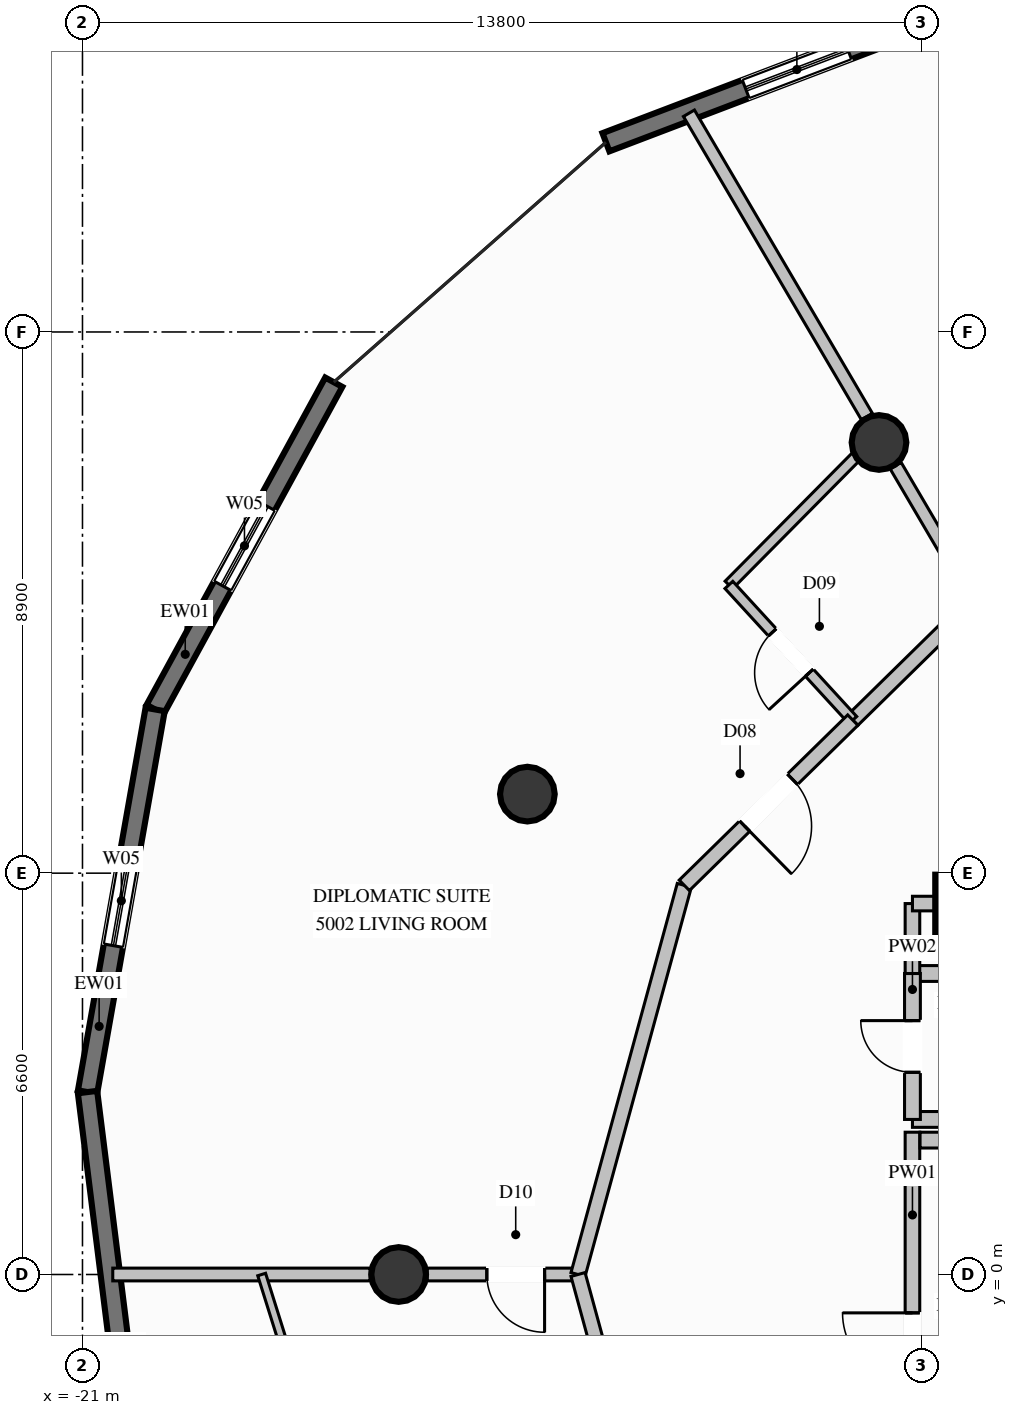
"""IFC4 building model, lengths in metres.
Left out: names, types, materials, properties, quantities, classifications, styles, units other than length and angle.
Written with IfcOpenShell. Run it as: python <this file> out.ifc"""

import sys

from ifc_helpers import new_model, si_unit, direction, frame, frame_2d, origin, origin_2d, place, context, subcontext, project, spatial, rectangle, circle, extrude, element, fill, save


model = new_model("IFC4")
c1 = context("Model", 3, precision=1e-05, world=origin(), true_north=direction((0.0, 1.0)))
c2 = subcontext(c1, "Body", "Model", "MODEL_VIEW")
j1 = project(units=[si_unit("LENGTHUNIT", "METRE"), si_unit("PLANEANGLEUNIT", "RADIAN")], contexts=[c1])
p1 = place(None, origin())
s1 = spatial("IfcSite", under=j1, at=p1, CompositionType="ELEMENT")
p2 = place(p1, origin())
s2 = spatial("IfcBuilding", under=s1, at=p2, CompositionType="ELEMENT")
p3 = place(p2, frame((0.0, 0.0, 187.6)))
s3 = spatial("IfcBuildingStorey", under=s2, at=p3, CompositionType="ELEMENT", Elevation=187.6)
p4 = place(p3, frame((-6.5, 6.1, 0.0), z_axis=(0.0, 0.0, 1.0), x_axis=(1.0, 0.0, 0.0)))
e1 = element("IfcColumn", 1, at=p4, inside=s3, PredefinedType="COLUMN", context=c2, shape_type="SweptSolid", body=[
    extrude(rectangle(XDim=0.95, YDim=0.95, at=origin_2d()), origin(), (0.0, 0.0, 1.0), 3.6),
])
for number, where, z_axis, x_axis in (
    (2, (-7.9, 13.683, 0.0), (0.0, 0.0, 1.0), (1.0, 0.0, 0.0)),
    (3, (-13.683, 7.9, 0.0), (0.0, 0.0, 1.0), (1.0, 0.0, 0.0)),
    (4, (-15.8, 0.0, 0.0), (0.0, 0.0, 1.0), (1.0, 0.0, 0.0)),
):
    element("IfcColumn", number, at=place(p3, frame(where, z_axis=z_axis, x_axis=x_axis)), inside=s3, PredefinedType="COLUMN", context=c2, shape_type="SweptSolid", body=[
        extrude(circle(Radius=0.45, at=origin_2d()), origin(), (0.0, 0.0, 1.0), 3.6),
    ])
p5 = place(p3, frame((-12.391, 18.62, 0.0), z_axis=(0.0, 0.0, 1.0), x_axis=(0.934568736607, 0.355782625429, 0.0)))
e5 = element("IfcWall", 5, at=p5, inside=s3, PredefinedType="SOLIDWALL", context=c2, shape_type="SweptSolid", body=[
    extrude(rectangle(XDim=5.967, YDim=0.32, at=frame_2d((2.983, 0.0))), origin(), (0.0, 0.0, 1.0), 3.36),
])
p6 = place(p5, frame((2.46, 0.0, 0.35)))
e6 = element("IfcOpeningElement", 6, at=p6, cuts=e5, PredefinedType="OPENING", context=c2, shape_type="SweptSolid", body=[
    extrude(rectangle(XDim=1.8, YDim=2.6, at=frame_2d((0.9, 1.3))), frame((0.0, 0.17, 0.0), z_axis=(0.0, -1.0, 0.0), x_axis=(1.0, 0.0, 0.0)), (0.0, 0.0, 1.0), 0.34),
])
p7 = place(p3, frame((-19.805, 9.292, 0.0), z_axis=(0.0, 0.0, 1.0), x_axis=(0.479142226632, 0.877737276557, 0.0)))
e7 = element("IfcWall", 7, at=p7, inside=s3, PredefinedType="SOLIDWALL", context=c2, shape_type="SweptSolid", body=[
    extrude(rectangle(XDim=6.132, YDim=0.32, at=frame_2d((3.066, 0.0))), origin(), (0.0, 0.0, 1.0), 3.36),
])
p8 = place(p7, frame((2.316, 0.0, 0.85)))
e8 = element("IfcOpeningElement", 8, at=p8, cuts=e7, PredefinedType="OPENING", context=c2, shape_type="SweptSolid", body=[
    extrude(rectangle(XDim=1.5, YDim=1.2, at=frame_2d((0.75, 0.6))), frame((0.0, 0.17, 0.0), z_axis=(0.0, -1.0, 0.0), x_axis=(1.0, 0.0, 0.0)), (0.0, 0.0, 1.0), 0.34),
])
p9 = place(p3, frame((-20.917, 3.0, 0.0), z_axis=(0.0, 0.0, 1.0), x_axis=(0.174044717196, 0.984737750072, 0.0)))
e9 = element("IfcWall", 9, at=p9, inside=s3, PredefinedType="SOLIDWALL", context=c2, shape_type="SweptSolid", body=[
    extrude(rectangle(XDim=6.389, YDim=0.32, at=frame_2d((3.195, 0.0))), origin(), (0.0, 0.0, 1.0), 3.36),
])
p10 = place(p9, frame((2.445, 0.0, 0.85)))
e10 = element("IfcOpeningElement", 10, at=p10, cuts=e9, PredefinedType="OPENING", context=c2, shape_type="SweptSolid", body=[
    extrude(rectangle(XDim=1.5, YDim=1.2, at=frame_2d((0.75, 0.6))), frame((0.0, 0.17, 0.0), z_axis=(0.0, -1.0, 0.0), x_axis=(1.0, 0.0, 0.0)), (0.0, 0.0, 1.0), 0.34),
])
p11 = place(p3, frame((-20.093, -3.585, 0.0), z_axis=(0.0, 0.0, 1.0), x_axis=(-0.12416151274, 0.992262021219, 0.0)))
e11 = element("IfcWall", 11, at=p11, inside=s3, PredefinedType="SOLIDWALL", context=c2, shape_type="SweptSolid", body=[
    extrude(rectangle(XDim=6.636, YDim=0.32, at=frame_2d((3.318, 0.0))), origin(), (0.0, 0.0, 1.0), 3.36),
])
p12 = place(p11, frame((1.004, 0.0, 0.85)))
e12 = element("IfcOpeningElement", 12, at=p12, cuts=e11, PredefinedType="OPENING", context=c2, shape_type="SweptSolid", body=[
    extrude(rectangle(XDim=1.5, YDim=1.2, at=frame_2d((0.75, 0.6))), frame((0.0, 0.17, 0.0), z_axis=(0.0, -1.0, 0.0), x_axis=(1.0, 0.0, 0.0)), (0.0, 0.0, 1.0), 0.34),
])
p13 = place(p3, frame((-7.35, -3.38, 0.0), z_axis=(0.0, 0.0, 1.0), x_axis=(0.0, 1.0, 0.0)))
e13 = element("IfcWall", 13, at=p13, inside=s3, PredefinedType="PARTITIONING", context=c2, shape_type="SweptSolid", body=[
    extrude(rectangle(XDim=5.72, YDim=0.24, at=frame_2d((2.86, 0.0))), origin(), (0.0, 0.0, 1.0), 2.445),
])
p14 = place(p13, frame((1.599, 0.0, 0.0)))
e14 = element("IfcOpeningElement", 14, at=p14, cuts=e13, PredefinedType="OPENING", context=c2, shape_type="SweptSolid", body=[
    extrude(rectangle(XDim=1.15, YDim=2.2, at=frame_2d((0.575, 1.1))), frame((0.0, 0.13, 0.0), z_axis=(0.0, -1.0, 0.0), x_axis=(1.0, 0.0, 0.0)), (0.0, 0.0, 1.0), 0.26),
])
p15 = place(p3, frame((-7.225, 2.21, 0.0), z_axis=(0.0, 0.0, 1.0), x_axis=(1.0, 0.0, 0.0)))
e15 = element("IfcWall", 15, at=p15, inside=s3, PredefinedType="PARTITIONING", context=c2, shape_type="SweptSolid", body=[
    extrude(rectangle(XDim=0.875, YDim=0.26, at=frame_2d((0.438, 0.0))), origin(), (0.0, 0.0, 1.0), 3.36),
])
for number, where, z_axis, x_axis in (
    (16, (-7.35, 4.95, 0.0), (0.0, 0.0, 1.0), (1.0, 0.0, 0.0)),
    (17, (-7.35, 2.55, 0.0), (0.0, 0.0, 1.0), (1.0, 0.0, 0.0)),
):
    element("IfcWall", number, at=place(p3, frame(where, z_axis=z_axis, x_axis=x_axis)), inside=s3, PredefinedType="PARTITIONING", context=c2, shape_type="SweptSolid", body=[
        extrude(rectangle(XDim=0.93, YDim=0.26, at=frame_2d((0.465, 0.0))), origin(), (0.0, 0.0, 1.0), 3.36),
    ])
p16 = place(p3, frame((-7.35, 2.55, 0.0), z_axis=(0.0, 0.0, 1.0), x_axis=(0.0, 1.0, 0.0)))
e18 = element("IfcWall", 18, at=p16, inside=s3, PredefinedType="PARTITIONING", context=c2, shape_type="SweptSolid", body=[
    extrude(rectangle(XDim=2.4, YDim=0.26, at=frame_2d((1.2, 0.0))), origin(), (0.0, 0.0, 1.0), 2.445),
])
p17 = place(p16, frame((0.775, 0.0, 0.0)))
e19 = element("IfcOpeningElement", 19, at=p17, cuts=e18, PredefinedType="OPENING", context=c2, shape_type="SweptSolid", body=[
    extrude(rectangle(XDim=0.85, YDim=2.05, at=frame_2d((0.425, 1.025))), frame((0.0, 0.14, 0.0), z_axis=(0.0, -1.0, 0.0), x_axis=(1.0, 0.0, 0.0)), (0.0, 0.0, 1.0), 0.28),
])
p18 = place(p3, frame((-7.35, 4.95, 0.0), z_axis=(0.0, 0.0, 1.0), x_axis=(0.0, 1.0, 0.0)))
e20 = element("IfcWall", 20, at=p18, inside=s3, PredefinedType="PARTITIONING", context=c2, shape_type="SweptSolid", body=[
    extrude(rectangle(XDim=1.15, YDim=0.24, at=frame_2d((0.575, 0.0))), origin(), (0.0, 0.0, 1.0), 2.445),
])
p19 = place(p3, frame((-7.35, 6.1, 0.0), z_axis=(0.0, 0.0, 1.0), x_axis=(1.0, 0.0, 0.0)))
e21 = element("IfcWall", 21, at=p19, inside=s3, PredefinedType="PARTITIONING", context=c2, shape_type="SweptSolid", body=[
    extrude(rectangle(XDim=0.85, YDim=0.24, at=frame_2d((0.425, 0.0))), origin(), (0.0, 0.0, 1.0), 2.801),
])
p20 = place(p3, frame((-6.325, 11.085, 0.0), z_axis=(0.0, 0.0, 1.0), x_axis=(-0.506285052897, 0.862366189744, 0.0)))
e22 = element("IfcWall", 22, at=p20, inside=s3, PredefinedType="PARTITIONING", context=c2, shape_type="SweptSolid", body=[
    extrude(rectangle(XDim=2.57, YDim=0.21, at=frame_2d((1.285, 0.0))), origin(), (0.0, 0.0, 1.0), 2.801),
])
p21 = place(p3, frame((-8.099, 14.109, 0.0), z_axis=(0.0, 0.0, 1.0), x_axis=(-0.506071559284, 0.862491493804, 0.0)))
e23 = element("IfcWall", 23, at=p21, inside=s3, PredefinedType="PARTITIONING", context=c2, shape_type="SweptSolid", body=[
    extrude(rectangle(XDim=5.783, YDim=0.21, at=frame_2d((2.892, 0.0))), origin(), (0.0, 0.0, 1.0), 3.36),
])
p22 = place(p3, frame((-12.85, 0.0, 0.0), z_axis=(0.0, 0.0, 1.0), x_axis=(-1.0, 0.0, 0.0)))
e24 = element("IfcWall", 24, at=p22, inside=s3, PredefinedType="PARTITIONING", context=c2, shape_type="SweptSolid", body=[
    extrude(rectangle(XDim=2.48, YDim=0.21, at=frame_2d((1.24, 0.0))), origin(), (0.0, 0.0, 1.0), 2.419),
])
p23 = place(p22, frame((0.55, 0.0, 0.0)))
e25 = element("IfcOpeningElement", 25, at=p23, cuts=e24, PredefinedType="OPENING", context=c2, shape_type="SweptSolid", body=[
    extrude(rectangle(XDim=0.95, YDim=2.1, at=frame_2d((0.475, 1.05))), frame((0.0, 0.115, 0.0), z_axis=(0.0, -1.0, 0.0), x_axis=(1.0, 0.0, 0.0)), (0.0, 0.0, 1.0), 0.23),
])
p24 = place(p3, frame((-16.27, 0.0, 0.0), z_axis=(0.0, 0.0, 1.0), x_axis=(-1.0, 0.0, 0.0)))
e26 = element("IfcWall", 26, at=p24, inside=s3, PredefinedType="PARTITIONING", context=c2, shape_type="SweptSolid", body=[
    extrude(rectangle(XDim=4.232, YDim=0.21, at=frame_2d((2.116, 0.0))), origin(), (0.0, 0.0, 1.0), 2.419),
])
p25 = place(p3, frame((-6.325, 11.085, 0.0), z_axis=(0.0, 0.0, 1.0), x_axis=(-0.713850549357, -0.700298074524, 0.0)))
e27 = element("IfcWall", 27, at=p25, inside=s3, PredefinedType="PARTITIONING", context=c2, shape_type="SweptSolid", body=[
    extrude(rectangle(XDim=2.81, YDim=0.24, at=frame_2d((1.405, 0.0))), origin(), (0.0, 0.0, 1.0), 3.36),
])
p26 = place(p3, frame((-7.923, 13.809, 0.0), z_axis=(0.0, 0.0, 1.0), x_axis=(-0.703762044394, -0.710435771108, 0.0)))
e28 = element("IfcWall", 28, at=p26, inside=s3, PredefinedType="PLUMBINGWALL", context=c2, shape_type="SweptSolid", body=[
    extrude(rectangle(XDim=3.475, YDim=0.175, at=frame_2d((1.738, 0.0))), origin(), (0.0, 0.0, 1.0), 2.929),
])
p27 = place(p3, frame((-8.331, 9.117, 0.0), z_axis=(0.0, 0.0, 1.0), x_axis=(-0.675717296863, 0.737160860817, 0.0)))
e29 = element("IfcWall", 29, at=p27, inside=s3, PredefinedType="PLUMBINGWALL", context=c2, shape_type="SweptSolid", body=[
    extrude(rectangle(XDim=3.016, YDim=0.175, at=frame_2d((1.508, 0.0))), origin(), (0.0, 0.0, 1.0), 3.36),
])
p28 = place(p27, frame((1.058, 0.0, 0.0)))
e30 = element("IfcOpeningElement", 30, at=p28, cuts=e29, PredefinedType="OPENING", context=c2, shape_type="SweptSolid", body=[
    extrude(rectangle(XDim=0.9, YDim=2.1, at=frame_2d((0.45, 1.05))), frame((0.0, 0.098, 0.0), z_axis=(0.0, -1.0, 0.0), x_axis=(1.0, 0.0, 0.0)), (0.0, 0.0, 1.0), 0.195),
])
p29 = place(p3, frame((-11.102, 6.4, 0.0), z_axis=(0.0, 0.0, 1.0), x_axis=(-0.263484816116, -0.96466354325, 0.0)))
e31 = element("IfcWall", 31, at=p29, inside=s3, PredefinedType="PARTITIONING", context=c2, shape_type="SweptSolid", body=[
    extrude(rectangle(XDim=6.634, YDim=0.24, at=frame_2d((3.317, 0.0))), origin(), (0.0, 0.0, 1.0), 3.36),
])
p30 = place(p3, frame((-8.331, 9.117, 0.0), z_axis=(0.0, 0.0, 1.0), x_axis=(-0.714024122855, -0.700121098084, 0.0)))
e32 = element("IfcWall", 32, at=p30, inside=s3, PredefinedType="PARTITIONING", context=c2, shape_type="SweptSolid", body=[
    extrude(rectangle(XDim=3.881, YDim=0.24, at=frame_2d((1.94, 0.0))), origin(), (0.0, 0.0, 1.0), 3.36),
])
p31 = place(p30, frame((1.39, 0.0, 0.0)))
e33 = element("IfcOpeningElement", 33, at=p31, cuts=e32, PredefinedType="OPENING", context=c2, shape_type="SweptSolid", body=[
    extrude(rectangle(XDim=1.1, YDim=2.3, at=frame_2d((0.55, 1.15))), frame((0.0, 0.13, 0.0), z_axis=(0.0, -1.0, 0.0), x_axis=(1.0, 0.0, 0.0)), (0.0, 0.0, 1.0), 0.26),
])
p32 = place(p3, frame((-12.85, 0.0, 0.0), z_axis=(0.0, 0.0, 1.0), x_axis=(0.263484816116, -0.96466354325, 0.0)))
e34 = element("IfcWall", 34, at=p32, inside=s3, PredefinedType="PARTITIONING", context=c2, shape_type="SweptSolid", body=[
    extrude(rectangle(XDim=6.634, YDim=0.24, at=frame_2d((3.317, 0.0))), origin(), (0.0, 0.0, 1.0), 3.36),
])
p33 = place(p3, frame((-18.053, 0.0, 0.0), z_axis=(0.0, 0.0, 1.0), x_axis=(0.299503167855, -0.954095305745, 0.0)))
e35 = element("IfcWall", 35, at=p33, inside=s3, PredefinedType="PARTITIONING", context=c2, shape_type="SweptSolid", body=[
    extrude(rectangle(XDim=9.245, YDim=0.135, at=frame_2d((4.623, 0.0))), origin(), (0.0, 0.0, 1.0), 3.36),
])
p34 = place(p33, frame((4.148, 0.0, 0.0)))
e36 = element("IfcOpeningElement", 36, at=p34, cuts=e35, PredefinedType="OPENING", context=c2, shape_type="SweptSolid", body=[
    extrude(rectangle(XDim=0.95, YDim=2.1, at=frame_2d((0.475, 1.05))), frame((0.0, 0.078, 0.0), z_axis=(0.0, -1.0, 0.0), x_axis=(1.0, 0.0, 0.0)), (0.0, 0.0, 1.0), 0.155),
])
p35 = place(p6, origin())
e37 = element("IfcWindow", 37, at=p35, inside=s3, PartitioningType="SINGLE_PANEL", PredefinedType="WINDOW", context=c2, shape_type="SweptSolid", body=[
    extrude(rectangle(XDim=1.8, YDim=2.6, at=frame_2d((0.9, 1.3))), frame((0.0, 0.03, 0.0), z_axis=(0.0, -1.0, 0.0), x_axis=(1.0, 0.0, 0.0)), (0.0, 0.0, 1.0), 0.06),
])
fill(e6, e37)
p36 = place(p8, origin())
e38 = element("IfcWindow", 38, at=p36, inside=s3, PartitioningType="SINGLE_PANEL", PredefinedType="WINDOW", context=c2, shape_type="SweptSolid", body=[
    extrude(rectangle(XDim=1.5, YDim=1.2, at=frame_2d((0.75, 0.6))), frame((0.0, 0.03, 0.0), z_axis=(0.0, -1.0, 0.0), x_axis=(1.0, 0.0, 0.0)), (0.0, 0.0, 1.0), 0.06),
])
fill(e8, e38)
p37 = place(p10, origin())
e39 = element("IfcWindow", 39, at=p37, inside=s3, PartitioningType="SINGLE_PANEL", PredefinedType="WINDOW", context=c2, shape_type="SweptSolid", body=[
    extrude(rectangle(XDim=1.5, YDim=1.2, at=frame_2d((0.75, 0.6))), frame((0.0, 0.03, 0.0), z_axis=(0.0, -1.0, 0.0), x_axis=(1.0, 0.0, 0.0)), (0.0, 0.0, 1.0), 0.06),
])
fill(e10, e39)
p38 = place(p14, origin())
e40 = element("IfcDoor", 40, at=p38, inside=s3, OperationType="SINGLE_SWING_RIGHT", PredefinedType="DOOR", context=c2, shape_type="SweptSolid", body=[
    extrude(rectangle(XDim=1.15, YDim=2.2, at=frame_2d((0.575, 1.1))), frame((0.0, 0.025, 0.0), z_axis=(0.0, -1.0, 0.0), x_axis=(1.0, 0.0, 0.0)), (0.0, 0.0, 1.0), 0.05),
])
fill(e14, e40)
p39 = place(p17, origin())
e41 = element("IfcDoor", 41, at=p39, inside=s3, OperationType="SINGLE_SWING_RIGHT", PredefinedType="DOOR", context=c2, shape_type="SweptSolid", body=[
    extrude(rectangle(XDim=0.85, YDim=2.05, at=frame_2d((0.425, 1.025))), frame((0.0, 0.025, 0.0), z_axis=(0.0, -1.0, 0.0), x_axis=(1.0, 0.0, 0.0)), (0.0, 0.0, 1.0), 0.05),
])
fill(e19, e41)
p40 = place(p28, origin())
e42 = element("IfcDoor", 42, at=p40, inside=s3, OperationType="SINGLE_SWING_LEFT", PredefinedType="DOOR", context=c2, shape_type="SweptSolid", body=[
    extrude(rectangle(XDim=0.9, YDim=2.1, at=frame_2d((0.45, 1.05))), frame((0.0, 0.025, 0.0), z_axis=(0.0, -1.0, 0.0), x_axis=(1.0, 0.0, 0.0)), (0.0, 0.0, 1.0), 0.05),
])
fill(e30, e42)
p41 = place(p31, origin())
e43 = element("IfcDoor", 43, at=p41, inside=s3, OperationType="SINGLE_SWING_RIGHT", PredefinedType="DOOR", context=c2, shape_type="SweptSolid", body=[
    extrude(rectangle(XDim=1.1, YDim=2.3, at=frame_2d((0.55, 1.15))), frame((0.0, 0.025, 0.0), z_axis=(0.0, -1.0, 0.0), x_axis=(1.0, 0.0, 0.0)), (0.0, 0.0, 1.0), 0.05),
])
fill(e33, e43)
p42 = place(p23, origin())
e44 = element("IfcDoor", 44, at=p42, inside=s3, OperationType="SINGLE_SWING_LEFT", PredefinedType="DOOR", context=c2, shape_type="SweptSolid", body=[
    extrude(rectangle(XDim=0.95, YDim=2.1, at=frame_2d((0.475, 1.05))), frame((0.0, 0.025, 0.0), z_axis=(0.0, -1.0, 0.0), x_axis=(1.0, 0.0, 0.0)), (0.0, 0.0, 1.0), 0.05),
])
fill(e25, e44)
save(model, sys.argv[1])
